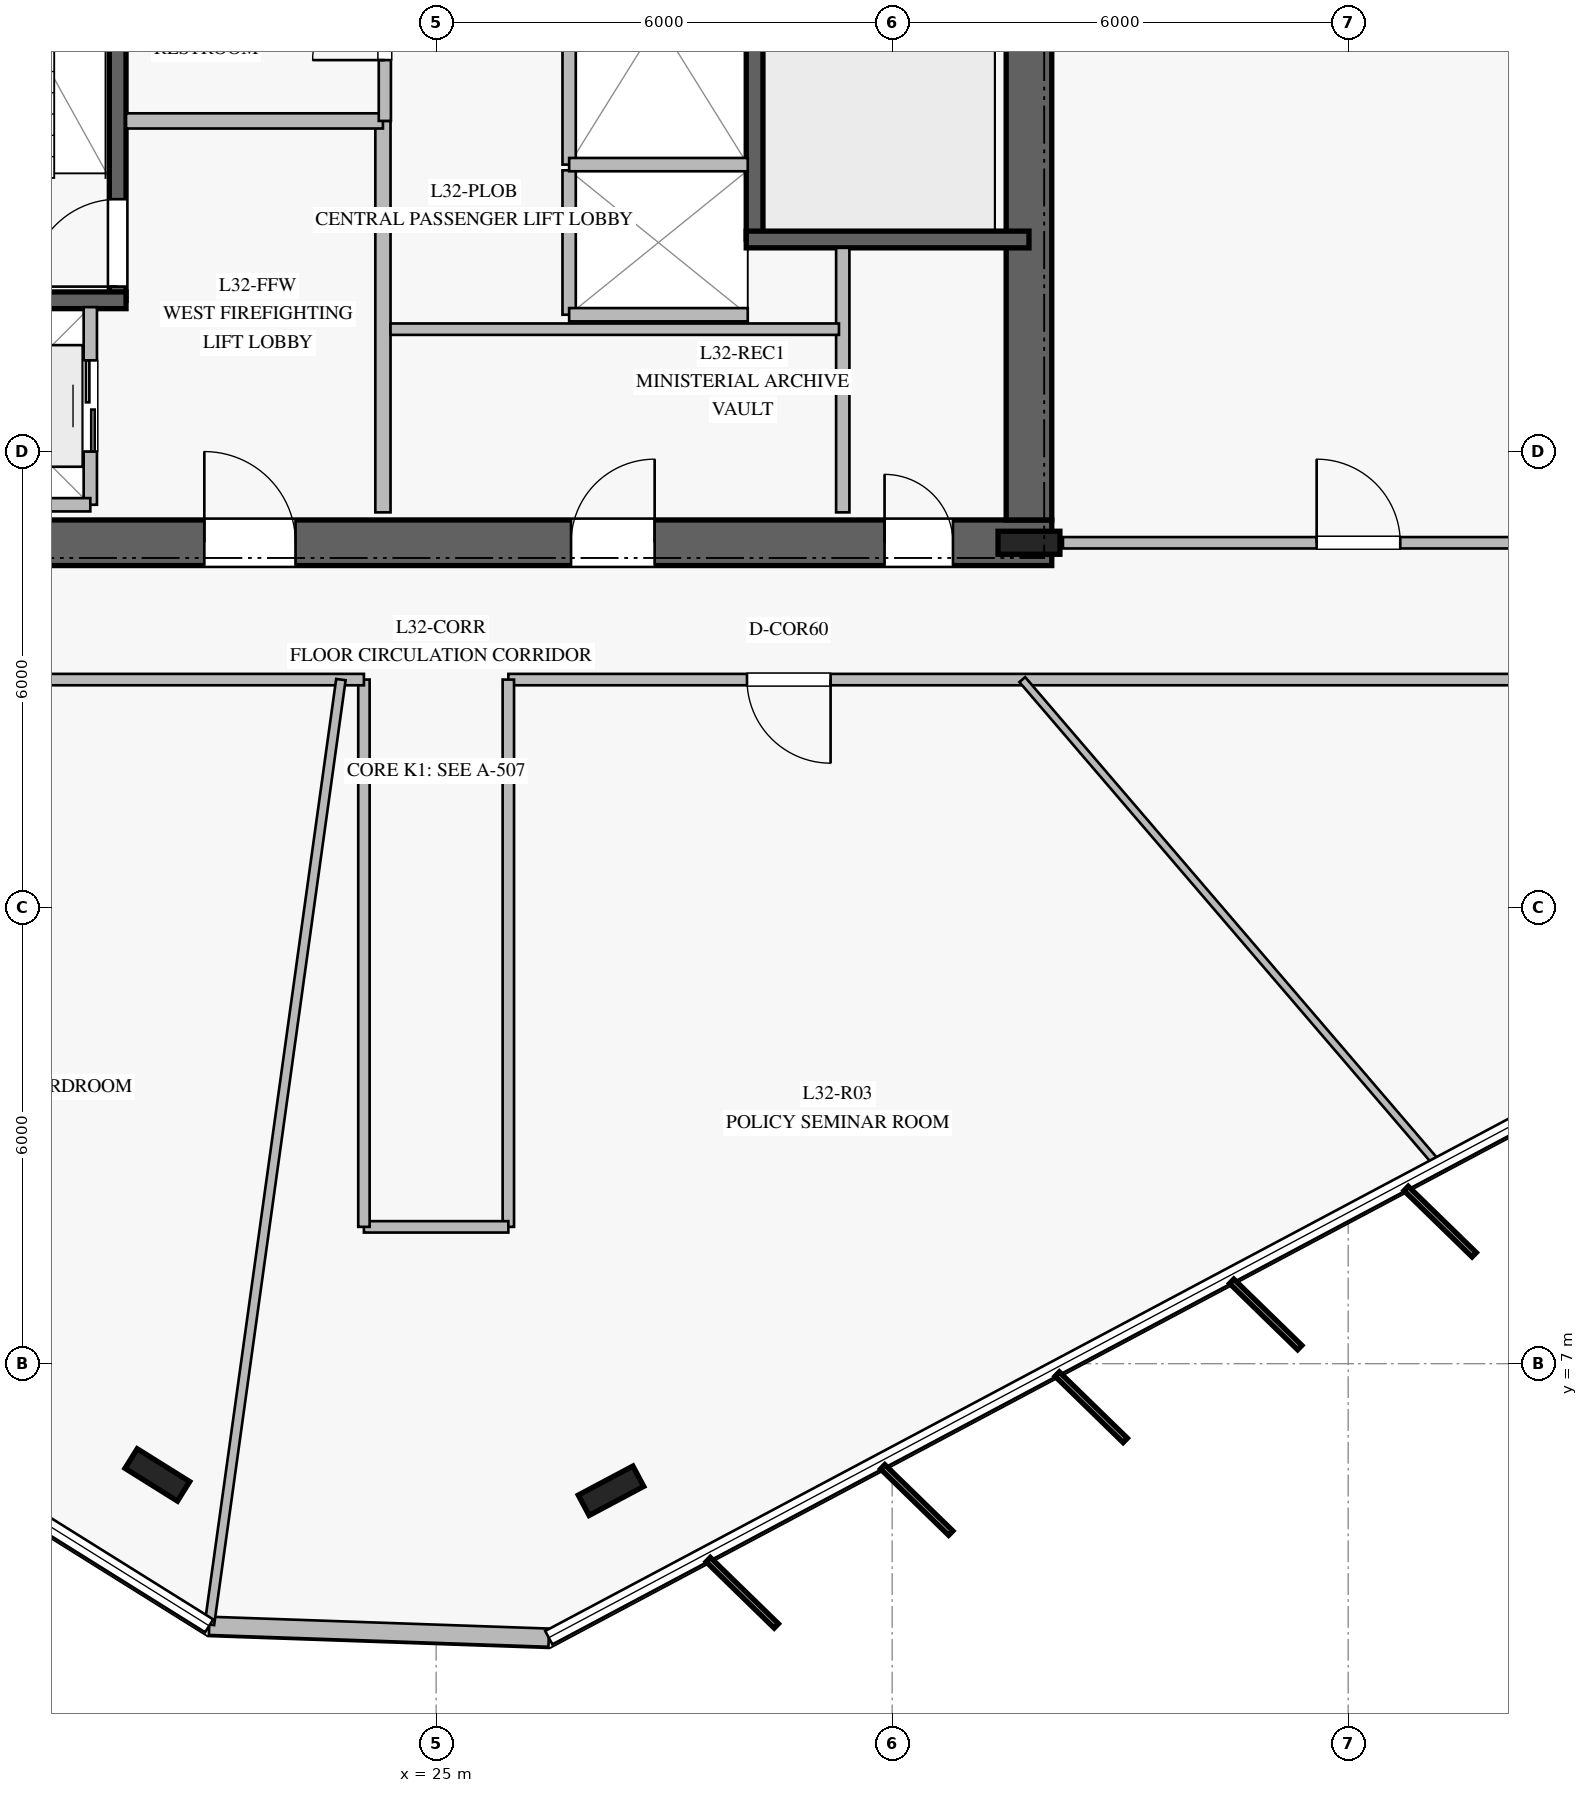
"""IFC4 building model, lengths in metres.
Left out: names, types, materials, properties, quantities, classifications, styles, units other than length and angle.
Written with IfcOpenShell. Run it as: python <this file> out.ifc"""

import sys

from ifc_helpers import new_model, si_unit, direction, frame, frame_2d, origin, origin_2d, place, context, subcontext, project, spatial, rectangle, i_section, extrude, element, fill, save


model = new_model("IFC4")
c1 = context("Model", 3, precision=1e-05, world=origin(), true_north=direction((0.0, 1.0)))
c2 = subcontext(c1, "Body", "Model", "MODEL_VIEW")
j1 = project(units=[si_unit("LENGTHUNIT", "METRE"), si_unit("PLANEANGLEUNIT", "RADIAN")], contexts=[c1])
p1 = place(None, origin())
s1 = spatial("IfcSite", under=j1, at=p1, CompositionType="ELEMENT")
p2 = place(p1, origin())
s2 = spatial("IfcBuilding", under=s1, at=p2, CompositionType="ELEMENT")
p3 = place(p2, frame((0.0, 0.0, 134.4)))
s3 = spatial("IfcBuildingStorey", under=s2, at=p3, CompositionType="ELEMENT", Elevation=134.4)
p4 = place(p3, frame((16.9, 17.8, 0.0), z_axis=(0.0, 0.0, 1.0), x_axis=(1.0, 0.0, 0.0)))
e1 = element("IfcWall", 1, at=p4, inside=s3, PredefinedType="SHEAR", context=c2, shape_type="SweptSolid", body=[
    extrude(rectangle(XDim=16.2, YDim=0.6, at=frame_2d((8.1, 0.0))), origin(), (0.0, 0.0, 1.0), 3.76),
])
p5 = place(p4, frame((5.05, 0.0, 0.0)))
e2 = element("IfcOpeningElement", 2, at=p5, cuts=e1, PredefinedType="OPENING", context=c2, shape_type="SweptSolid", body=[
    extrude(rectangle(XDim=1.2, YDim=2.25, at=frame_2d((0.6, 1.125))), frame((0.0, 0.31, 0.0), z_axis=(0.0, -1.0, 0.0), x_axis=(1.0, 0.0, 0.0)), (0.0, 0.0, 1.0), 0.62),
])
p6 = place(p4, frame((14.0, 0.0, 0.0)))
e3 = element("IfcOpeningElement", 3, at=p6, cuts=e1, PredefinedType="OPENING", context=c2, shape_type="SweptSolid", body=[
    extrude(rectangle(XDim=0.9, YDim=2.1, at=frame_2d((0.45, 1.05))), frame((0.0, 0.31, 0.0), z_axis=(0.0, -1.0, 0.0), x_axis=(1.0, 0.0, 0.0)), (0.0, 0.0, 1.0), 0.62),
])
p7 = place(p4, frame((9.875, 0.0, 0.0)))
e4 = element("IfcOpeningElement", 4, at=p7, cuts=e1, PredefinedType="OPENING", context=c2, shape_type="SweptSolid", body=[
    extrude(rectangle(XDim=1.1, YDim=2.2, at=frame_2d((0.55, 1.1))), frame((0.0, 0.31, 0.0), z_axis=(0.0, -1.0, 0.0), x_axis=(1.0, 0.0, 0.0)), (0.0, 0.0, 1.0), 0.62),
])
p8 = place(p3, frame((32.8, 18.1, 0.0), z_axis=(0.0, 0.0, 1.0), x_axis=(0.0, 1.0, 0.0)))
e5 = element("IfcWall", 5, at=p8, inside=s3, PredefinedType="SHEAR", context=c2, shape_type="SweptSolid", body=[
    extrude(rectangle(XDim=13.8, YDim=0.6, at=frame_2d((6.9, 0.0))), origin(), (0.0, 0.0, 1.0), 3.76),
])
p9 = place(p3, frame((32.8, 17.8, 0.0), z_axis=(0.0, 0.0, 1.0), x_axis=(1.0, 0.0, 0.0)))
e6 = element("IfcColumn", 6, at=p9, inside=s3, PredefinedType="COLUMN", context=c2, shape_type="SweptSolid", body=[
    extrude(i_section(OverallWidth=0.303, OverallDepth=0.814, WebThickness=0.021, FlangeThickness=0.04, at=origin_2d()), origin(), (0.0, 0.0, 1.0), 4.0),
])
p10 = place(p3, frame((20.81, 20.99, 0.0), z_axis=(0.0, 0.0, 1.0), x_axis=(0.0, 1.0, 0.0)))
e7 = element("IfcWall", 7, at=p10, inside=s3, PredefinedType="SOLIDWALL", context=c2, shape_type="SweptSolid", body=[
    extrude(rectangle(XDim=7.22, YDim=0.22, at=frame_2d((3.61, 0.0))), origin(), (0.0, 0.0, 1.0), 3.76),
])
p11 = place(p10, frame((0.18, 0.0, 0.0)))
e8 = element("IfcOpeningElement", 8, at=p11, cuts=e7, PredefinedType="OPENING", context=c2, shape_type="SweptSolid", body=[
    extrude(rectangle(XDim=1.15, YDim=2.2, at=frame_2d((0.575, 1.1))), frame((0.0, 0.12, 0.0), z_axis=(0.0, -1.0, 0.0), x_axis=(1.0, 0.0, 0.0)), (0.0, 0.0, 1.0), 0.24),
])
p12 = place(p3, frame((17.2, 20.99, 0.0), z_axis=(0.0, 0.0, 1.0), x_axis=(1.0, 0.0, 0.0)))
e9 = element("IfcWall", 9, at=p12, inside=s3, PredefinedType="SOLIDWALL", context=c2, shape_type="SweptSolid", body=[
    extrude(rectangle(XDim=3.72, YDim=0.22, at=frame_2d((1.86, 0.0))), origin(), (0.0, 0.0, 1.0), 3.76),
])
p13 = place(p3, frame((29.19, 21.79, 0.0), z_axis=(0.0, 0.0, 1.0), x_axis=(0.0, 1.0, 0.0)))
e10 = element("IfcWall", 10, at=p13, inside=s3, PredefinedType="SOLIDWALL", context=c2, shape_type="SweptSolid", body=[
    extrude(rectangle(XDim=7.22, YDim=0.22, at=frame_2d((3.61, 0.0))), origin(), (0.0, 0.0, 1.0), 3.76),
])
p14 = place(p13, frame((5.88, 0.0, 0.0)))
e11 = element("IfcOpeningElement", 11, at=p14, cuts=e10, PredefinedType="OPENING", context=c2, shape_type="SweptSolid", body=[
    extrude(rectangle(XDim=1.15, YDim=2.2, at=frame_2d((0.575, 1.1))), frame((0.0, 0.12, 0.0), z_axis=(0.0, -1.0, 0.0), x_axis=(1.0, 0.0, 0.0)), (0.0, 0.0, 1.0), 0.24),
])
p15 = place(p3, frame((29.08, 21.79, 0.0), z_axis=(0.0, 0.0, 1.0), x_axis=(1.0, 0.0, 0.0)))
e12 = element("IfcWall", 12, at=p15, inside=s3, PredefinedType="SOLIDWALL", context=c2, shape_type="SweptSolid", body=[
    extrude(rectangle(XDim=3.72, YDim=0.22, at=frame_2d((1.86, 0.0))), origin(), (0.0, 0.0, 1.0), 3.76),
])
for number, where, z_axis, x_axis in (
    (13, (21.332, 5.536, 0.0), (0.0, 0.0, 1.0), (-0.848, 0.53, 0.0)),
    (14, (27.301, 5.328, 0.0), (0.0, 0.0, 1.0), (0.883, 0.469, 0.0)),
):
    element("IfcColumn", number, at=place(p3, frame(where, z_axis=z_axis, x_axis=x_axis)), inside=s3, PredefinedType="COLUMN", context=c2, shape_type="SweptSolid", body=[
        extrude(i_section(OverallWidth=0.303, OverallDepth=0.814, WebThickness=0.021, FlangeThickness=0.04, at=origin_2d()), origin(), (0.0, 0.0, 1.0), 4.0),
    ])
p16 = place(p3, frame((22.014, 3.551, 0.0), z_axis=(0.0, 0.0, 1.0), x_axis=(0.999390988908, -0.034894860495, 0.0)))
e15 = element("IfcWall", 15, at=p16, inside=s3, PredefinedType="STANDARD", context=c2, shape_type="SweptSolid", body=[
    extrude(rectangle(XDim=4.471, YDim=0.24, at=frame_2d((2.235, 0.0))), origin(), (0.0, 0.0, 1.0), 3.76),
])
p17 = place(p3, frame((24.3, 18.2, 0.0), z_axis=(0.0, 0.0, 1.0), x_axis=(0.0, 1.0, 0.0)))
e16 = element("IfcWall", 16, at=p17, inside=s3, PredefinedType="PARTITIONING", context=c2, shape_type="SweptSolid", body=[
    extrude(rectangle(XDim=5.15, YDim=0.2, at=frame_2d((2.575, 0.0))), origin(), (0.0, 0.0, 1.0), 3.76),
])
p18 = place(p3, frame((20.92, 23.35, 0.0), z_axis=(0.0, 0.0, 1.0), x_axis=(1.0, 0.0, 0.0)))
e17 = element("IfcWall", 17, at=p18, inside=s3, PredefinedType="PARTITIONING", context=c2, shape_type="SweptSolid", body=[
    extrude(rectangle(XDim=3.38, YDim=0.2, at=frame_2d((1.69, 0.0))), origin(), (0.0, 0.0, 1.0), 3.76),
])
p19 = place(p3, frame((24.325, 23.35, 0.0), z_axis=(0.0, 0.0, 1.0), x_axis=(0.0, 1.0, 0.0)))
e18 = element("IfcWall", 18, at=p19, inside=s3, PredefinedType="PLUMBINGWALL", context=c2, shape_type="SweptSolid", body=[
    extrude(rectangle(XDim=4.93, YDim=0.16, at=frame_2d((2.465, 0.0))), origin(), (0.0, 0.0, 1.0), 3.76),
])
p20 = place(p19, frame((0.8, 0.0, 0.0)))
e19 = element("IfcOpeningElement", 19, at=p20, cuts=e18, PredefinedType="OPENING", context=c2, shape_type="SweptSolid", body=[
    extrude(rectangle(XDim=0.95, YDim=2.1, at=frame_2d((0.475, 1.05))), frame((0.0, 0.09, 0.0), z_axis=(0.0, -1.0, 0.0), x_axis=(1.0, 0.0, 0.0)), (0.0, 0.0, 1.0), 0.18),
])
p21 = place(p19, frame((3.26, 0.0, 0.0)))
e20 = element("IfcOpeningElement", 20, at=p21, cuts=e18, PredefinedType="OPENING", context=c2, shape_type="SweptSolid", body=[
    extrude(rectangle(XDim=0.9, YDim=2.1, at=frame_2d((0.45, 1.05))), frame((0.0, 0.09, 0.0), z_axis=(0.0, -1.0, 0.0), x_axis=(1.0, 0.0, 0.0)), (0.0, 0.0, 1.0), 0.18),
])
p22 = place(p3, frame((30.35, 18.2, 0.0), z_axis=(0.0, 0.0, 1.0), x_axis=(0.0, 1.0, 0.0)))
e21 = element("IfcWall", 21, at=p22, inside=s3, PredefinedType="PARTITIONING", context=c2, shape_type="SweptSolid", body=[
    extrude(rectangle(XDim=3.48, YDim=0.175, at=frame_2d((1.74, 0.0))), origin(), (0.0, 0.0, 1.0), 3.76),
])
p23 = place(p3, frame((24.4, 20.61, 0.0), z_axis=(0.0, 0.0, 1.0), x_axis=(1.0, 0.0, 0.0)))
e22 = element("IfcWall", 22, at=p23, inside=s3, PredefinedType="PARTITIONING", context=c2, shape_type="SweptSolid", body=[
    extrude(rectangle(XDim=5.9, YDim=0.15, at=frame_2d((2.95, 0.0))), origin(), (0.0, 0.0, 1.0), 3.76),
])
p24 = place(p3, frame((26.75, 20.8, 0.0), z_axis=(0.0, 0.0, 1.0), x_axis=(0.0, 1.0, 0.0)))
e23 = element("IfcWall", 23, at=p24, inside=s3, PredefinedType="PARTITIONING", context=c2, shape_type="SweptSolid", body=[
    extrude(rectangle(XDim=1.9, YDim=0.175, at=frame_2d((0.95, 0.0))), origin(), (0.0, 0.0, 1.0), 3.76),
])
p25 = place(p3, frame((26.75, 20.8, 0.0), z_axis=(0.0, 0.0, 1.0), x_axis=(1.0, 0.0, 0.0)))
e24 = element("IfcWall", 24, at=p25, inside=s3, PredefinedType="PARTITIONING", context=c2, shape_type="SweptSolid", body=[
    extrude(rectangle(XDim=2.35, YDim=0.175, at=frame_2d((1.175, 0.0))), origin(), (0.0, 0.0, 1.0), 3.76),
])
p26 = place(p3, frame((26.75, 22.775, 0.0), z_axis=(0.0, 0.0, 1.0), x_axis=(0.0, 1.0, 0.0)))
e25 = element("IfcWall", 25, at=p26, inside=s3, PredefinedType="PARTITIONING", context=c2, shape_type="SweptSolid", body=[
    extrude(rectangle(XDim=1.9, YDim=0.175, at=frame_2d((0.95, 0.0))), origin(), (0.0, 0.0, 1.0), 3.76),
])
p27 = place(p3, frame((26.75, 22.775, 0.0), z_axis=(0.0, 0.0, 1.0), x_axis=(1.0, 0.0, 0.0)))
e26 = element("IfcWall", 26, at=p27, inside=s3, PredefinedType="PARTITIONING", context=c2, shape_type="SweptSolid", body=[
    extrude(rectangle(XDim=2.35, YDim=0.175, at=frame_2d((1.175, 0.0))), origin(), (0.0, 0.0, 1.0), 3.76),
])
p28 = place(p3, frame((20.45, 18.3, 0.0), z_axis=(0.0, 0.0, 1.0), x_axis=(0.0, 1.0, 0.0)))
e27 = element("IfcWall", 27, at=p28, inside=s3, PredefinedType="PARTITIONING", context=c2, shape_type="SweptSolid", body=[
    extrude(rectangle(XDim=2.6, YDim=0.175, at=frame_2d((1.3, 0.0))), origin(), (0.0, 0.0, 1.0), 3.76),
])
p29 = place(p28, frame((0.7, 0.0, 0.0)))
e28 = element("IfcOpeningElement", 28, at=p29, cuts=e27, PredefinedType="OPENING", context=c2, shape_type="SweptSolid", body=[
    extrude(rectangle(XDim=1.2, YDim=2.2, at=frame_2d((0.6, 1.1))), frame((0.0, 0.098, 0.0), z_axis=(0.0, -1.0, 0.0), x_axis=(1.0, 0.0, 0.0)), (0.0, 0.0, 1.0), 0.195),
])
p30 = place(p3, frame((17.85, 18.3, 0.0), z_axis=(0.0, 0.0, 1.0), x_axis=(1.0, 0.0, 0.0)))
e29 = element("IfcWall", 29, at=p30, inside=s3, PredefinedType="PARTITIONING", context=c2, shape_type="SweptSolid", body=[
    extrude(rectangle(XDim=2.6, YDim=0.175, at=frame_2d((1.3, 0.0))), origin(), (0.0, 0.0, 1.0), 3.76),
])
p31 = place(p3, frame((33.247, 17.8, 0.0), z_axis=(0.0, 0.0, 1.0), x_axis=(1.0, 0.0, 0.0)))
e30 = element("IfcWall", 30, at=p31, inside=s3, PredefinedType="PARTITIONING", context=c2, shape_type="SweptSolid", body=[
    extrude(rectangle(XDim=7.953, YDim=0.15, at=frame_2d((3.977, 0.0))), origin(), (0.0, 0.0, 1.0), 3.21),
])
p32 = place(p31, frame((3.338, 0.0, 0.0)))
e31 = element("IfcOpeningElement", 31, at=p32, cuts=e30, PredefinedType="OPENING", context=c2, shape_type="SweptSolid", body=[
    extrude(rectangle(XDim=1.1, YDim=2.2, at=frame_2d((0.55, 1.1))), frame((0.0, 0.085, 0.0), z_axis=(0.0, -1.0, 0.0), x_axis=(1.0, 0.0, 0.0)), (0.0, 0.0, 1.0), 0.17),
])
p33 = place(p3, frame((41.2, 16.0, 0.0), z_axis=(0.0, 0.0, 1.0), x_axis=(-1.0, 0.0, 0.0)))
e32 = element("IfcWall", 32, at=p33, inside=s3, PredefinedType="PARTITIONING", context=c2, shape_type="SweptSolid", body=[
    extrude(rectangle(XDim=15.25, YDim=0.15, at=frame_2d((7.625, 0.0))), origin(), (0.0, 0.0, 1.0), 3.21),
])
p34 = place(p33, frame((11.01, 0.0, 0.0)))
e33 = element("IfcOpeningElement", 33, at=p34, cuts=e32, PredefinedType="OPENING", context=c2, shape_type="SweptSolid", body=[
    extrude(rectangle(XDim=1.1, YDim=2.2, at=frame_2d((0.55, 1.1))), frame((0.0, 0.085, 0.0), z_axis=(0.0, -1.0, 0.0), x_axis=(1.0, 0.0, 0.0)), (0.0, 0.0, 1.0), 0.17),
])
p35 = place(p3, frame((25.95, 16.0, 0.0), z_axis=(0.0, 0.0, 1.0), x_axis=(0.0, -1.0, 0.0)))
e34 = element("IfcWall", 34, at=p35, inside=s3, PredefinedType="PARTITIONING", context=c2, shape_type="SweptSolid", body=[
    extrude(rectangle(XDim=7.2, YDim=0.15, at=frame_2d((3.6, 0.0))), origin(), (0.0, 0.0, 1.0), 3.36),
])
p36 = place(p3, frame((25.95, 8.8, 0.0), z_axis=(0.0, 0.0, 1.0), x_axis=(-1.0, 0.0, 0.0)))
e35 = element("IfcWall", 35, at=p36, inside=s3, PredefinedType="PARTITIONING", context=c2, shape_type="SweptSolid", body=[
    extrude(rectangle(XDim=1.9, YDim=0.15, at=frame_2d((0.95, 0.0))), origin(), (0.0, 0.0, 1.0), 3.76),
])
p37 = place(p3, frame((24.05, 8.8, 0.0), z_axis=(0.0, 0.0, 1.0), x_axis=(0.0, 1.0, 0.0)))
e36 = element("IfcWall", 36, at=p37, inside=s3, PredefinedType="PARTITIONING", context=c2, shape_type="SweptSolid", body=[
    extrude(rectangle(XDim=7.2, YDim=0.15, at=frame_2d((3.6, 0.0))), origin(), (0.0, 0.0, 1.0), 3.36),
])
p38 = place(p3, frame((24.05, 16.0, 0.0), z_axis=(0.0, 0.0, 1.0), x_axis=(-1.0, 0.0, 0.0)))
e37 = element("IfcWall", 37, at=p38, inside=s3, PredefinedType="PARTITIONING", context=c2, shape_type="SweptSolid", body=[
    extrude(rectangle(XDim=6.85, YDim=0.15, at=frame_2d((3.425, 0.0))), origin(), (0.0, 0.0, 1.0), 3.21),
])
p39 = place(p3, frame((23.747, 16.0, 0.0), z_axis=(0.0, 0.0, 1.0), x_axis=(-0.137839255744, -0.990454612577, 0.0)))
e38 = element("IfcWall", 38, at=p39, inside=s3, PredefinedType="PARTITIONING", context=c2, shape_type="SweptSolid", body=[
    extrude(rectangle(XDim=12.551, YDim=0.125, at=frame_2d((6.275, 0.0))), origin(), (0.0, 0.0, 1.0), 3.16),
])
p40 = place(p3, frame((32.712, 16.0, 0.0), z_axis=(0.0, 0.0, 1.0), x_axis=(0.650714678519, -0.759322334164, 0.0)))
e39 = element("IfcWall", 39, at=p40, inside=s3, PredefinedType="MOVABLE", context=c2, shape_type="SweptSolid", body=[
    extrude(rectangle(XDim=8.389, YDim=0.1, at=frame_2d((4.195, 0.0))), origin(), (0.0, 0.0, 1.0), 3.05),
])
p41 = place(p11, origin())
e40 = element("IfcDoor", 40, at=p41, inside=s3, OperationType="SINGLE_SWING_LEFT", PredefinedType="DOOR", context=c2, shape_type="SweptSolid", body=[
    extrude(rectangle(XDim=1.15, YDim=2.2, at=frame_2d((0.575, 1.1))), frame((0.0, 0.025, 0.0), z_axis=(0.0, -1.0, 0.0), x_axis=(1.0, 0.0, 0.0)), (0.0, 0.0, 1.0), 0.05),
])
fill(e8, e40)
p42 = place(p5, origin())
e41 = element("IfcDoor", 41, at=p42, inside=s3, OperationType="SINGLE_SWING_LEFT", PredefinedType="DOOR", context=c2, shape_type="SweptSolid", body=[
    extrude(rectangle(XDim=1.2, YDim=2.25, at=frame_2d((0.6, 1.125))), frame((0.0, 0.025, 0.0), z_axis=(0.0, -1.0, 0.0), x_axis=(1.0, 0.0, 0.0)), (0.0, 0.0, 1.0), 0.05),
])
fill(e2, e41)
p43 = place(p20, origin())
e42 = element("IfcDoor", 42, at=p43, inside=s3, OperationType="SINGLE_SWING_LEFT", PredefinedType="DOOR", context=c2, shape_type="SweptSolid", body=[
    extrude(rectangle(XDim=0.95, YDim=2.1, at=frame_2d((0.475, 1.05))), frame((0.0, 0.025, 0.0), z_axis=(0.0, -1.0, 0.0), x_axis=(1.0, 0.0, 0.0)), (0.0, 0.0, 1.0), 0.05),
])
fill(e19, e42)
p44 = place(p6, origin())
e43 = element("IfcDoor", 43, at=p44, inside=s3, OperationType="SINGLE_SWING_LEFT", PredefinedType="DOOR", context=c2, shape_type="SweptSolid", body=[
    extrude(rectangle(XDim=0.9, YDim=2.1, at=frame_2d((0.45, 1.05))), frame((0.0, 0.025, 0.0), z_axis=(0.0, -1.0, 0.0), x_axis=(1.0, 0.0, 0.0)), (0.0, 0.0, 1.0), 0.05),
])
fill(e3, e43)
p45 = place(p7, origin())
e44 = element("IfcDoor", 44, at=p45, inside=s3, OperationType="SINGLE_SWING_RIGHT", PredefinedType="DOOR", context=c2, shape_type="SweptSolid", body=[
    extrude(rectangle(XDim=1.1, YDim=2.2, at=frame_2d((0.55, 1.1))), frame((0.0, 0.025, 0.0), z_axis=(0.0, -1.0, 0.0), x_axis=(1.0, 0.0, 0.0)), (0.0, 0.0, 1.0), 0.05),
])
fill(e4, e44)
p46 = place(p29, origin())
e45 = element("IfcDoor", 45, at=p46, inside=s3, OperationType="DOUBLE_DOOR_SLIDING", PredefinedType="DOOR", context=c2, shape_type="SweptSolid", body=[
    extrude(rectangle(XDim=1.2, YDim=2.2, at=frame_2d((0.6, 1.1))), frame((0.0, 0.025, 0.0), z_axis=(0.0, -1.0, 0.0), x_axis=(1.0, 0.0, 0.0)), (0.0, 0.0, 1.0), 0.05),
])
fill(e28, e45)
p47 = place(p34, origin())
e46 = element("IfcDoor", 46, at=p47, inside=s3, OperationType="SINGLE_SWING_LEFT", PredefinedType="DOOR", context=c2, shape_type="SweptSolid", body=[
    extrude(rectangle(XDim=1.1, YDim=2.2, at=frame_2d((0.55, 1.1))), frame((0.0, 0.025, 0.0), z_axis=(0.0, -1.0, 0.0), x_axis=(1.0, 0.0, 0.0)), (0.0, 0.0, 1.0), 0.05),
])
fill(e33, e46)
p48 = place(p32, origin())
e47 = element("IfcDoor", 47, at=p48, inside=s3, OperationType="SINGLE_SWING_LEFT", PredefinedType="DOOR", context=c2, shape_type="SweptSolid", body=[
    extrude(rectangle(XDim=1.1, YDim=2.2, at=frame_2d((0.55, 1.1))), frame((0.0, 0.025, 0.0), z_axis=(0.0, -1.0, 0.0), x_axis=(1.0, 0.0, 0.0)), (0.0, 0.0, 1.0), 0.05),
])
fill(e31, e47)
save(model, sys.argv[1])
